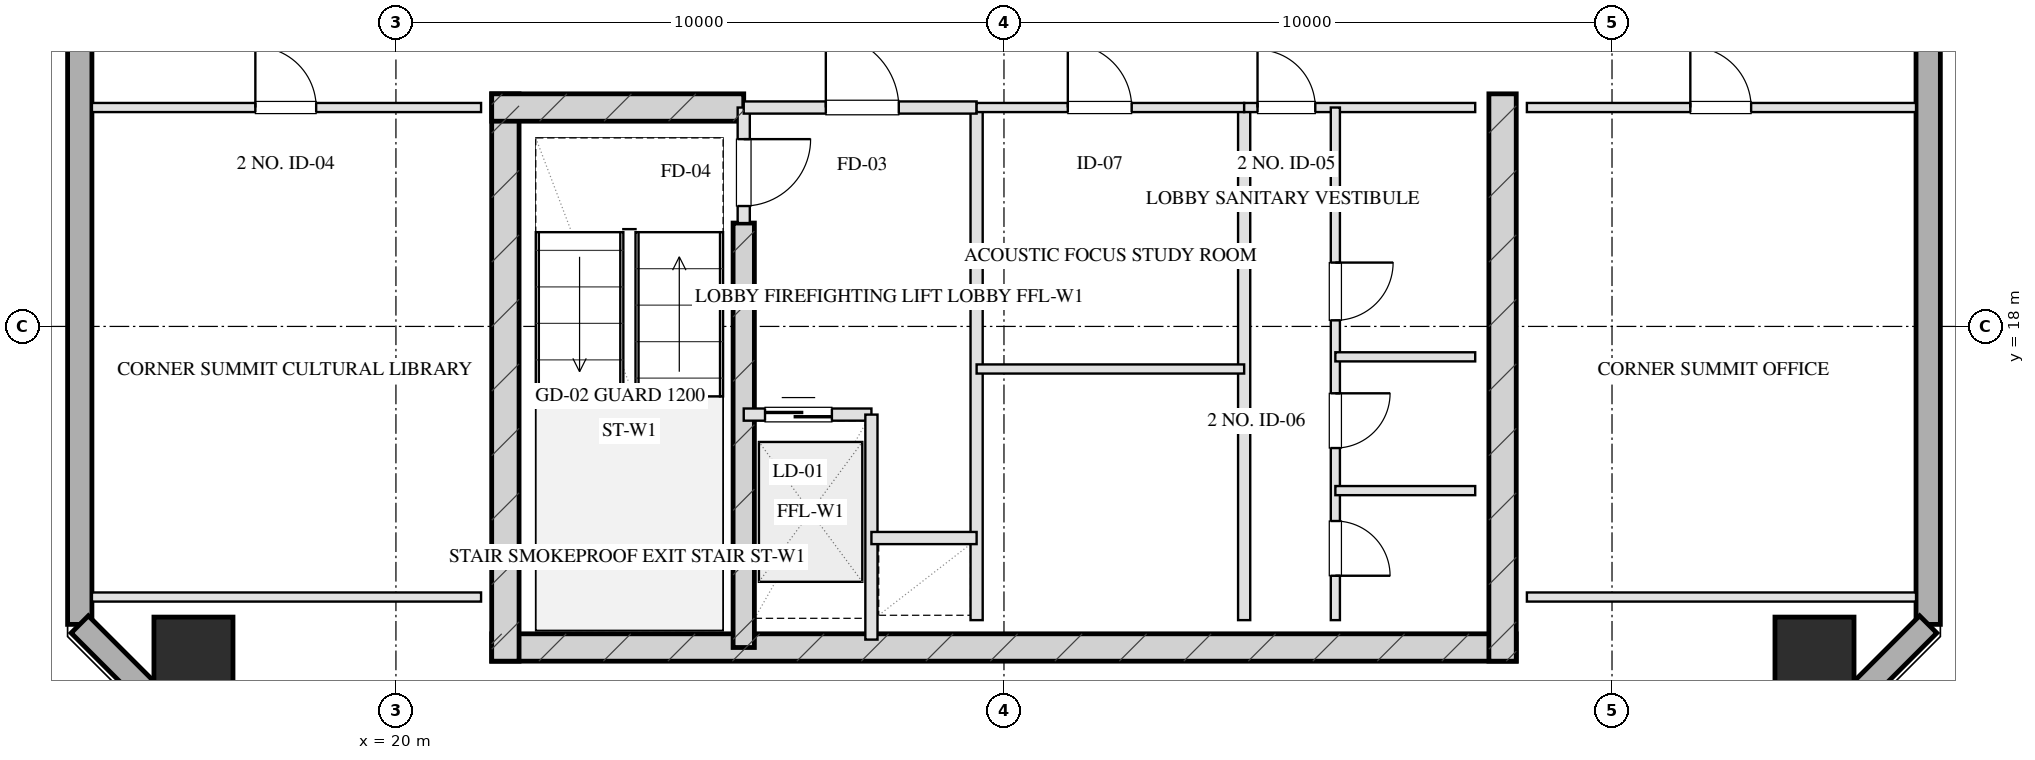
"""IFC4 building model, lengths in metres.
Left out: names, types, materials, properties, quantities, classifications, styles, units other than length and angle.
Written with IfcOpenShell. Run it as: python <this file> out.ifc"""

import sys

from ifc_helpers import new_model, si_unit, direction, frame, frame_2d, origin, origin_2d, place, context, subcontext, project, spatial, rectangle, hollow_rectangle, extrude, element, fill, save


model = new_model("IFC4")
c1 = context("Model", 3, precision=1e-05, world=origin(), true_north=direction((0.0, 1.0)))
c2 = subcontext(c1, "Body", "Model", "MODEL_VIEW")
j1 = project(units=[si_unit("LENGTHUNIT", "METRE"), si_unit("PLANEANGLEUNIT", "RADIAN")], contexts=[c1])
p1 = place(None, origin())
s1 = spatial("IfcSite", under=j1, at=p1, CompositionType="ELEMENT")
p2 = place(p1, origin())
s2 = spatial("IfcBuilding", under=s1, at=p2, CompositionType="ELEMENT")
p3 = place(p2, frame((0.0, 0.0, 272.8)))
s3 = spatial("IfcBuildingStorey", under=s2, at=p3, CompositionType="ELEMENT", Elevation=272.8)
p4 = place(p3, frame((21.575, 12.72, 0.0), z_axis=(0.0, 0.0, 1.0), x_axis=(1.0, 0.0, 0.0)))
e1 = element("IfcWall", 1, at=p4, inside=s3, PredefinedType="SHEAR", context=c2, shape_type="SweptSolid", body=[
    extrude(rectangle(XDim=16.85, YDim=0.45, at=frame_2d((8.425, 0.0))), origin(), (0.0, 0.0, 1.0), 3.2),
])
for number, where, z_axis, x_axis in (
    (2, (21.8, 21.825, 0.0), (0.0, 0.0, 1.0), (0.0, -1.0, 0.0)),
    (3, (38.2, 21.825, 0.0), (0.0, 0.0, 1.0), (0.0, -1.0, 0.0)),
):
    element("IfcWall", number, at=place(p3, frame(where, z_axis=z_axis, x_axis=x_axis)), inside=s3, PredefinedType="SHEAR", context=c2, shape_type="SweptSolid", body=[
        extrude(rectangle(XDim=9.33, YDim=0.45, at=frame_2d((4.665, 0.0))), origin(), (0.0, 0.0, 1.0), 3.2),
    ])
p5 = place(p3, frame((25.72, 19.7, 0.0), z_axis=(0.0, 0.0, 1.0), x_axis=(0.0, -1.0, 0.0)))
e4 = element("IfcWall", 4, at=p5, inside=s3, PredefinedType="SHEAR", context=c2, shape_type="SweptSolid", body=[
    extrude(rectangle(XDim=6.98, YDim=0.35, at=frame_2d((3.49, 0.0))), origin(), (0.0, 0.0, 1.0), 3.2),
])
p6 = place(p3, frame((21.575, 21.6, 0.0), z_axis=(0.0, 0.0, 1.0), x_axis=(1.0, 0.0, 0.0)))
e5 = element("IfcWall", 5, at=p6, inside=s3, PredefinedType="SHEAR", context=c2, shape_type="SweptSolid", body=[
    extrude(rectangle(XDim=4.145, YDim=0.45, at=frame_2d((2.073, 0.0))), origin(), (0.0, 0.0, 1.0), 3.2),
])
for number, where, z_axis, x_axis in (
    (6, (16.67, 12.57, 0.0), (0.0, 0.0, 1.0), (1.0, 0.0, 0.0)),
    (7, (43.33, 12.57, 0.0), (0.0, 0.0, 1.0), (1.0, 0.0, 0.0)),
):
    element("IfcColumn", number, at=place(p3, frame(where, z_axis=z_axis, x_axis=x_axis)), inside=s3, PredefinedType="COLUMN", context=c2, shape_type="SweptSolid", body=[
        extrude(hollow_rectangle(XDim=1.3, YDim=1.3, WallThickness=0.045, at=origin_2d()), origin(), (0.0, 0.0, 1.0), 3.201),
    ])
p7 = place(p3, frame((14.8, 13.1, 0.0), z_axis=(0.0, 0.0, 1.0), x_axis=(0.0, 1.0, 0.0)))
e8 = element("IfcWall", 8, at=p7, inside=s3, PredefinedType="SOLIDWALL", context=c2, shape_type="SweptSolid", body=[
    extrude(rectangle(XDim=41.8, YDim=0.4, at=frame_2d((20.9, 0.0))), origin(), (0.0, 0.0, 1.0), 2.36),
])
p8 = place(p7, frame((13.525, 0.0, 0.75)))
e9 = element("IfcOpeningElement", 9, at=p8, cuts=e8, PredefinedType="OPENING", context=c2, shape_type="SweptSolid", body=[
    extrude(rectangle(XDim=1.95, YDim=1.21, at=frame_2d((0.975, 0.605))), frame((0.0, 0.21, 0.0), z_axis=(0.0, -1.0, 0.0), x_axis=(1.0, 0.0, 0.0)), (0.0, 0.0, 1.0), 0.42),
])
p9 = place(p7, frame((17.325, 0.0, 0.75)))
e10 = element("IfcOpeningElement", 10, at=p9, cuts=e8, PredefinedType="OPENING", context=c2, shape_type="SweptSolid", body=[
    extrude(rectangle(XDim=1.95, YDim=1.21, at=frame_2d((0.975, 0.605))), frame((0.0, 0.21, 0.0), z_axis=(0.0, -1.0, 0.0), x_axis=(1.0, 0.0, 0.0)), (0.0, 0.0, 1.0), 0.42),
])
p10 = place(p7, frame((22.525, 0.0, 0.75)))
e11 = element("IfcOpeningElement", 11, at=p10, cuts=e8, PredefinedType="OPENING", context=c2, shape_type="SweptSolid", body=[
    extrude(rectangle(XDim=1.95, YDim=1.21, at=frame_2d((0.975, 0.605))), frame((0.0, 0.21, 0.0), z_axis=(0.0, -1.0, 0.0), x_axis=(1.0, 0.0, 0.0)), (0.0, 0.0, 1.0), 0.42),
])
p11 = place(p7, frame((26.325, 0.0, 0.75)))
e12 = element("IfcOpeningElement", 12, at=p11, cuts=e8, PredefinedType="OPENING", context=c2, shape_type="SweptSolid", body=[
    extrude(rectangle(XDim=1.95, YDim=1.21, at=frame_2d((0.975, 0.605))), frame((0.0, 0.21, 0.0), z_axis=(0.0, -1.0, 0.0), x_axis=(1.0, 0.0, 0.0)), (0.0, 0.0, 1.0), 0.42),
])
p12 = place(p3, frame((45.2, 54.9, 0.0), z_axis=(0.0, 0.0, 1.0), x_axis=(0.0, -1.0, 0.0)))
e13 = element("IfcWall", 13, at=p12, inside=s3, PredefinedType="SOLIDWALL", context=c2, shape_type="SweptSolid", body=[
    extrude(rectangle(XDim=41.8, YDim=0.4, at=frame_2d((20.9, 0.0))), origin(), (0.0, 0.0, 1.0), 2.36),
])
p13 = place(p12, frame((26.325, 0.0, 0.75)))
e14 = element("IfcOpeningElement", 14, at=p13, cuts=e13, PredefinedType="OPENING", context=c2, shape_type="SweptSolid", body=[
    extrude(rectangle(XDim=1.95, YDim=1.21, at=frame_2d((0.975, 0.605))), frame((0.0, 0.21, 0.0), z_axis=(0.0, -1.0, 0.0), x_axis=(1.0, 0.0, 0.0)), (0.0, 0.0, 1.0), 0.42),
])
p14 = place(p12, frame((22.525, 0.0, 0.75)))
e15 = element("IfcOpeningElement", 15, at=p14, cuts=e13, PredefinedType="OPENING", context=c2, shape_type="SweptSolid", body=[
    extrude(rectangle(XDim=1.95, YDim=1.21, at=frame_2d((0.975, 0.605))), frame((0.0, 0.21, 0.0), z_axis=(0.0, -1.0, 0.0), x_axis=(1.0, 0.0, 0.0)), (0.0, 0.0, 1.0), 0.42),
])
p15 = place(p12, frame((17.325, 0.0, 0.75)))
e16 = element("IfcOpeningElement", 16, at=p15, cuts=e13, PredefinedType="OPENING", context=c2, shape_type="SweptSolid", body=[
    extrude(rectangle(XDim=1.95, YDim=1.21, at=frame_2d((0.975, 0.605))), frame((0.0, 0.21, 0.0), z_axis=(0.0, -1.0, 0.0), x_axis=(1.0, 0.0, 0.0)), (0.0, 0.0, 1.0), 0.42),
])
p16 = place(p12, frame((13.525, 0.0, 0.75)))
e17 = element("IfcOpeningElement", 17, at=p16, cuts=e13, PredefinedType="OPENING", context=c2, shape_type="SweptSolid", body=[
    extrude(rectangle(XDim=1.95, YDim=1.21, at=frame_2d((0.975, 0.605))), frame((0.0, 0.21, 0.0), z_axis=(0.0, -1.0, 0.0), x_axis=(1.0, 0.0, 0.0)), (0.0, 0.0, 1.0), 0.42),
])
for number, where, z_axis, x_axis in (
    (18, (45.2, 13.1, 0.0), (0.0, 0.0, 1.0), (-0.707, -0.707, 0.0)),
    (19, (17.2, 10.7, 0.0), (0.0, 0.0, 1.0), (-0.707, 0.707, 0.0)),
):
    element("IfcWall", number, at=place(p3, frame(where, z_axis=z_axis, x_axis=x_axis)), inside=s3, PredefinedType="SOLIDWALL", context=c2, shape_type="SweptSolid", body=[
        extrude(rectangle(XDim=3.394, YDim=0.4, at=frame_2d((1.697, 0.0))), origin(), (0.0, 0.0, 1.0), 2.36),
    ])
p17 = place(p3, frame((25.72, 21.6, 0.0), z_axis=(0.0, 0.0, 1.0), x_axis=(0.0, -1.0, 0.0)))
e20 = element("IfcWall", 20, at=p17, inside=s3, PredefinedType="PARTITIONING", context=c2, shape_type="SweptSolid", body=[
    extrude(rectangle(XDim=1.9, YDim=0.2, at=frame_2d((0.95, 0.0))), origin(), (0.0, 0.0, 1.0), 2.925),
])
p18 = place(p17, frame((0.52, 0.0, 0.0)))
e21 = element("IfcOpeningElement", 21, at=p18, cuts=e20, PredefinedType="OPENING", context=c2, shape_type="SweptSolid", body=[
    extrude(rectangle(XDim=1.1, YDim=2.05, at=frame_2d((0.55, 1.025))), frame((0.0, 0.11, 0.0), z_axis=(0.0, -1.0, 0.0), x_axis=(1.0, 0.0, 0.0)), (0.0, 0.0, 1.0), 0.22),
])
p19 = place(p3, frame((29.55, 21.6, 0.0), z_axis=(0.0, 0.0, 1.0), x_axis=(0.0, -1.0, 0.0)))
e22 = element("IfcWall", 22, at=p19, inside=s3, PredefinedType="PARTITIONING", context=c2, shape_type="SweptSolid", body=[
    extrude(rectangle(XDim=8.43, YDim=0.2, at=frame_2d((4.215, 0.0))), origin(), (0.0, 0.0, 1.0), 2.925),
])
p20 = place(p3, frame((25.72, 21.6, 0.0), z_axis=(0.0, 0.0, 1.0), x_axis=(1.0, 0.0, 0.0)))
e23 = element("IfcWall", 23, at=p20, inside=s3, PredefinedType="PARTITIONING", context=c2, shape_type="SweptSolid", body=[
    extrude(rectangle(XDim=3.83, YDim=0.2, at=frame_2d((1.915, 0.0))), origin(), (0.0, 0.0, 1.0), 2.925),
])
p21 = place(p20, frame((1.35, 0.0, 0.0)))
e24 = element("IfcOpeningElement", 24, at=p21, cuts=e23, PredefinedType="OPENING", context=c2, shape_type="SweptSolid", body=[
    extrude(rectangle(XDim=1.2, YDim=2.05, at=frame_2d((0.6, 1.025))), frame((0.0, 0.11, 0.0), z_axis=(0.0, -1.0, 0.0), x_axis=(1.0, 0.0, 0.0)), (0.0, 0.0, 1.0), 0.22),
])
p22 = place(p3, frame((25.72, 16.55, 0.0), z_axis=(0.0, 0.0, 1.0), x_axis=(1.0, 0.0, 0.0)))
e25 = element("IfcWall", 25, at=p22, inside=s3, PredefinedType="PARTITIONING", context=c2, shape_type="SweptSolid", body=[
    extrude(rectangle(XDim=2.1, YDim=0.2, at=frame_2d((1.05, 0.0))), origin(), (0.0, 0.0, 1.0), 2.925),
])
p23 = place(p22, frame((0.35, 0.0, 0.0)))
e26 = element("IfcOpeningElement", 26, at=p23, cuts=e25, PredefinedType="OPENING", context=c2, shape_type="SweptSolid", body=[
    extrude(rectangle(XDim=1.1, YDim=2.05, at=frame_2d((0.55, 1.025))), frame((0.0, 0.11, 0.0), z_axis=(0.0, -1.0, 0.0), x_axis=(1.0, 0.0, 0.0)), (0.0, 0.0, 1.0), 0.22),
])
p24 = place(p3, frame((27.82, 16.55, 0.0), z_axis=(0.0, 0.0, 1.0), x_axis=(0.0, -1.0, 0.0)))
e27 = element("IfcWall", 27, at=p24, inside=s3, PredefinedType="PARTITIONING", context=c2, shape_type="SweptSolid", body=[
    extrude(rectangle(XDim=3.7, YDim=0.2, at=frame_2d((1.85, 0.0))), origin(), (0.0, 0.0, 1.0), 2.925),
])
p25 = place(p3, frame((27.82, 14.52, 0.0), z_axis=(0.0, 0.0, 1.0), x_axis=(1.0, 0.0, 0.0)))
e28 = element("IfcWall", 28, at=p25, inside=s3, PredefinedType="PARTITIONING", context=c2, shape_type="SweptSolid", body=[
    extrude(rectangle(XDim=1.73, YDim=0.2, at=frame_2d((0.865, 0.0))), origin(), (0.0, 0.0, 1.0), 2.925),
])
p26 = place(p3, frame((33.95, 21.6, 0.0), z_axis=(0.0, 0.0, 1.0), x_axis=(0.0, -1.0, 0.0)))
e29 = element("IfcWall", 29, at=p26, inside=s3, PredefinedType="PARTITIONING", context=c2, shape_type="SweptSolid", body=[
    extrude(rectangle(XDim=8.43, YDim=0.2, at=frame_2d((4.215, 0.0))), origin(), (0.0, 0.0, 1.0), 2.925),
])
p27 = place(p3, frame((29.55, 21.6, 0.0), z_axis=(0.0, 0.0, 1.0), x_axis=(1.0, 0.0, 0.0)))
e30 = element("IfcWall", 30, at=p27, inside=s3, PredefinedType="PARTITIONING", context=c2, shape_type="SweptSolid", body=[
    extrude(rectangle(XDim=4.4, YDim=0.15, at=frame_2d((2.2, 0.0))), origin(), (0.0, 0.0, 1.0), 2.925),
])
p28 = place(p27, frame((1.5, 0.0, 0.0)))
e31 = element("IfcOpeningElement", 31, at=p28, cuts=e30, PredefinedType="OPENING", context=c2, shape_type="SweptSolid", body=[
    extrude(rectangle(XDim=1.05, YDim=2.05, at=frame_2d((0.525, 1.025))), frame((0.0, 0.085, 0.0), z_axis=(0.0, -1.0, 0.0), x_axis=(1.0, 0.0, 0.0)), (0.0, 0.0, 1.0), 0.17),
])
p29 = place(p3, frame((29.55, 17.3, 0.0), z_axis=(0.0, 0.0, 1.0), x_axis=(1.0, 0.0, 0.0)))
e32 = element("IfcWall", 32, at=p29, inside=s3, PredefinedType="PARTITIONING", context=c2, shape_type="SweptSolid", body=[
    extrude(rectangle(XDim=4.4, YDim=0.15, at=frame_2d((2.2, 0.0))), origin(), (0.0, 0.0, 1.0), 2.925),
])
p30 = place(p3, frame((33.95, 21.6, 0.0), z_axis=(0.0, 0.0, 1.0), x_axis=(1.0, 0.0, 0.0)))
e33 = element("IfcWall", 33, at=p30, inside=s3, PredefinedType="PARTITIONING", context=c2, shape_type="SweptSolid", body=[
    extrude(rectangle(XDim=3.8, YDim=0.15, at=frame_2d((1.9, 0.0))), origin(), (0.0, 0.0, 1.0), 2.925),
])
p31 = place(p30, frame((0.22, 0.0, 0.0)))
e34 = element("IfcOpeningElement", 34, at=p31, cuts=e33, PredefinedType="OPENING", context=c2, shape_type="SweptSolid", body=[
    extrude(rectangle(XDim=0.95, YDim=2.05, at=frame_2d((0.475, 1.025))), frame((0.0, 0.085, 0.0), z_axis=(0.0, -1.0, 0.0), x_axis=(1.0, 0.0, 0.0)), (0.0, 0.0, 1.0), 0.17),
])
p32 = place(p3, frame((35.45, 21.6, 0.0), z_axis=(0.0, 0.0, 1.0), x_axis=(0.0, -1.0, 0.0)))
e35 = element("IfcWall", 35, at=p32, inside=s3, PredefinedType="PARTITIONING", context=c2, shape_type="SweptSolid", body=[
    extrude(rectangle(XDim=8.43, YDim=0.15, at=frame_2d((4.215, 0.0))), origin(), (0.0, 0.0, 1.0), 2.565),
])
p33 = place(p32, frame((2.55, 0.0, 0.0)))
e36 = element("IfcOpeningElement", 36, at=p33, cuts=e35, PredefinedType="OPENING", context=c2, shape_type="SweptSolid", body=[
    extrude(rectangle(XDim=0.95, YDim=2.05, at=frame_2d((0.475, 1.025))), frame((0.0, 0.085, 0.0), z_axis=(0.0, -1.0, 0.0), x_axis=(1.0, 0.0, 0.0)), (0.0, 0.0, 1.0), 0.17),
])
p34 = place(p32, frame((4.7, 0.0, 0.0)))
e37 = element("IfcOpeningElement", 37, at=p34, cuts=e35, PredefinedType="OPENING", context=c2, shape_type="SweptSolid", body=[
    extrude(rectangle(XDim=0.9, YDim=2.05, at=frame_2d((0.45, 1.025))), frame((0.0, 0.085, 0.0), z_axis=(0.0, -1.0, 0.0), x_axis=(1.0, 0.0, 0.0)), (0.0, 0.0, 1.0), 0.17),
])
p35 = place(p32, frame((6.8, 0.0, 0.0)))
e38 = element("IfcOpeningElement", 38, at=p35, cuts=e35, PredefinedType="OPENING", context=c2, shape_type="SweptSolid", body=[
    extrude(rectangle(XDim=0.9, YDim=2.05, at=frame_2d((0.45, 1.025))), frame((0.0, 0.085, 0.0), z_axis=(0.0, -1.0, 0.0), x_axis=(1.0, 0.0, 0.0)), (0.0, 0.0, 1.0), 0.17),
])
for number, where, z_axis, x_axis in (
    (39, (35.45, 17.5, 0.0), (0.0, 0.0, 1.0), (1.0, 0.0, 0.0)),
    (40, (35.45, 15.3, 0.0), (0.0, 0.0, 1.0), (1.0, 0.0, 0.0)),
):
    element("IfcWall", number, at=place(p3, frame(where, z_axis=z_axis, x_axis=x_axis)), inside=s3, PredefinedType="PARTITIONING", context=c2, shape_type="SweptSolid", body=[
        extrude(rectangle(XDim=2.3, YDim=0.15, at=frame_2d((1.15, 0.0))), origin(), (0.0, 0.0, 1.0), 2.925),
    ])
p36 = place(p3, frame((15.0, 13.55, 0.0), z_axis=(0.0, 0.0, 1.0), x_axis=(1.0, 0.0, 0.0)))
e41 = element("IfcWall", 41, at=p36, inside=s3, PredefinedType="PARTITIONING", context=c2, shape_type="SweptSolid", body=[
    extrude(rectangle(XDim=6.4, YDim=0.15, at=frame_2d((3.2, 0.0))), origin(), (0.0, 0.0, 1.0), 2.925),
])
p37 = place(p3, frame((15.0, 21.6, 0.0), z_axis=(0.0, 0.0, 1.0), x_axis=(1.0, 0.0, 0.0)))
e42 = element("IfcWall", 42, at=p37, inside=s3, PredefinedType="PARTITIONING", context=c2, shape_type="SweptSolid", body=[
    extrude(rectangle(XDim=6.4, YDim=0.15, at=frame_2d((3.2, 0.0))), origin(), (0.0, 0.0, 1.0), 2.925),
])
p38 = place(p37, frame((2.688, 0.0, 0.0)))
e43 = element("IfcOpeningElement", 43, at=p38, cuts=e42, PredefinedType="OPENING", context=c2, shape_type="SweptSolid", body=[
    extrude(rectangle(XDim=1.0, YDim=2.05, at=frame_2d((0.5, 1.025))), frame((0.0, 0.085, 0.0), z_axis=(0.0, -1.0, 0.0), x_axis=(1.0, 0.0, 0.0)), (0.0, 0.0, 1.0), 0.17),
])
p39 = place(p3, frame((38.6, 13.55, 0.0), z_axis=(0.0, 0.0, 1.0), x_axis=(1.0, 0.0, 0.0)))
e44 = element("IfcWall", 44, at=p39, inside=s3, PredefinedType="PARTITIONING", context=c2, shape_type="SweptSolid", body=[
    extrude(rectangle(XDim=6.4, YDim=0.15, at=frame_2d((3.2, 0.0))), origin(), (0.0, 0.0, 1.0), 2.925),
])
p40 = place(p3, frame((38.6, 21.6, 0.0), z_axis=(0.0, 0.0, 1.0), x_axis=(1.0, 0.0, 0.0)))
e45 = element("IfcWall", 45, at=p40, inside=s3, PredefinedType="PARTITIONING", context=c2, shape_type="SweptSolid", body=[
    extrude(rectangle(XDim=6.4, YDim=0.15, at=frame_2d((3.2, 0.0))), origin(), (0.0, 0.0, 1.0), 2.925),
])
p41 = place(p40, frame((2.688, 0.0, 0.0)))
e46 = element("IfcOpeningElement", 46, at=p41, cuts=e45, PredefinedType="OPENING", context=c2, shape_type="SweptSolid", body=[
    extrude(rectangle(XDim=1.0, YDim=2.05, at=frame_2d((0.5, 1.025))), frame((0.0, 0.085, 0.0), z_axis=(0.0, -1.0, 0.0), x_axis=(1.0, 0.0, 0.0)), (0.0, 0.0, 1.0), 0.17),
])
p42 = place(p18, origin())
e47 = element("IfcDoor", 47, at=p42, inside=s3, OperationType="SINGLE_SWING_LEFT", PredefinedType="DOOR", context=c2, shape_type="SweptSolid", body=[
    extrude(rectangle(XDim=1.1, YDim=2.05, at=frame_2d((0.55, 1.025))), frame((0.0, 0.025, 0.0), z_axis=(0.0, -1.0, 0.0), x_axis=(1.0, 0.0, 0.0)), (0.0, 0.0, 1.0), 0.05),
])
fill(e21, e47)
p43 = place(p21, origin())
e48 = element("IfcDoor", 48, at=p43, inside=s3, OperationType="SINGLE_SWING_LEFT", PredefinedType="DOOR", context=c2, shape_type="SweptSolid", body=[
    extrude(rectangle(XDim=1.2, YDim=2.05, at=frame_2d((0.6, 1.025))), frame((0.0, 0.025, 0.0), z_axis=(0.0, -1.0, 0.0), x_axis=(1.0, 0.0, 0.0)), (0.0, 0.0, 1.0), 0.05),
])
fill(e24, e48)
p44 = place(p23, origin())
e49 = element("IfcDoor", 49, at=p44, inside=s3, OperationType="DOUBLE_DOOR_SLIDING", PredefinedType="DOOR", context=c2, shape_type="SweptSolid", body=[
    extrude(rectangle(XDim=1.1, YDim=2.05, at=frame_2d((0.55, 1.025))), frame((0.0, 0.025, 0.0), z_axis=(0.0, -1.0, 0.0), x_axis=(1.0, 0.0, 0.0)), (0.0, 0.0, 1.0), 0.05),
])
fill(e26, e49)
p45 = place(p28, origin())
e50 = element("IfcDoor", 50, at=p45, inside=s3, OperationType="SINGLE_SWING_LEFT", PredefinedType="DOOR", context=c2, shape_type="SweptSolid", body=[
    extrude(rectangle(XDim=1.05, YDim=2.05, at=frame_2d((0.525, 1.025))), frame((0.0, 0.025, 0.0), z_axis=(0.0, -1.0, 0.0), x_axis=(1.0, 0.0, 0.0)), (0.0, 0.0, 1.0), 0.05),
])
fill(e31, e50)
p46 = place(p31, origin())
e51 = element("IfcDoor", 51, at=p46, inside=s3, OperationType="SINGLE_SWING_LEFT", PredefinedType="DOOR", context=c2, shape_type="SweptSolid", body=[
    extrude(rectangle(XDim=0.95, YDim=2.05, at=frame_2d((0.475, 1.025))), frame((0.0, 0.025, 0.0), z_axis=(0.0, -1.0, 0.0), x_axis=(1.0, 0.0, 0.0)), (0.0, 0.0, 1.0), 0.05),
])
fill(e34, e51)
p47 = place(p33, origin())
e52 = element("IfcDoor", 52, at=p47, inside=s3, OperationType="SINGLE_SWING_LEFT", PredefinedType="DOOR", context=c2, shape_type="SweptSolid", body=[
    extrude(rectangle(XDim=0.95, YDim=2.05, at=frame_2d((0.475, 1.025))), frame((0.0, 0.025, 0.0), z_axis=(0.0, -1.0, 0.0), x_axis=(1.0, 0.0, 0.0)), (0.0, 0.0, 1.0), 0.05),
])
fill(e36, e52)
p48 = place(p34, origin())
e53 = element("IfcDoor", 53, at=p48, inside=s3, OperationType="SINGLE_SWING_LEFT", PredefinedType="DOOR", context=c2, shape_type="SweptSolid", body=[
    extrude(rectangle(XDim=0.9, YDim=2.05, at=frame_2d((0.45, 1.025))), frame((0.0, 0.025, 0.0), z_axis=(0.0, -1.0, 0.0), x_axis=(1.0, 0.0, 0.0)), (0.0, 0.0, 1.0), 0.05),
])
fill(e37, e53)
p49 = place(p35, origin())
e54 = element("IfcDoor", 54, at=p49, inside=s3, OperationType="SINGLE_SWING_RIGHT", PredefinedType="DOOR", context=c2, shape_type="SweptSolid", body=[
    extrude(rectangle(XDim=0.9, YDim=2.05, at=frame_2d((0.45, 1.025))), frame((0.0, 0.025, 0.0), z_axis=(0.0, -1.0, 0.0), x_axis=(1.0, 0.0, 0.0)), (0.0, 0.0, 1.0), 0.05),
])
fill(e38, e54)
p50 = place(p38, origin())
e55 = element("IfcDoor", 55, at=p50, inside=s3, OperationType="SINGLE_SWING_LEFT", PredefinedType="DOOR", context=c2, shape_type="SweptSolid", body=[
    extrude(rectangle(XDim=1.0, YDim=2.05, at=frame_2d((0.5, 1.025))), frame((0.0, 0.025, 0.0), z_axis=(0.0, -1.0, 0.0), x_axis=(1.0, 0.0, 0.0)), (0.0, 0.0, 1.0), 0.05),
])
fill(e43, e55)
p51 = place(p41, origin())
e56 = element("IfcDoor", 56, at=p51, inside=s3, OperationType="SINGLE_SWING_LEFT", PredefinedType="DOOR", context=c2, shape_type="SweptSolid", body=[
    extrude(rectangle(XDim=1.0, YDim=2.05, at=frame_2d((0.5, 1.025))), frame((0.0, 0.025, 0.0), z_axis=(0.0, -1.0, 0.0), x_axis=(1.0, 0.0, 0.0)), (0.0, 0.0, 1.0), 0.05),
])
fill(e46, e56)
save(model, sys.argv[1])
